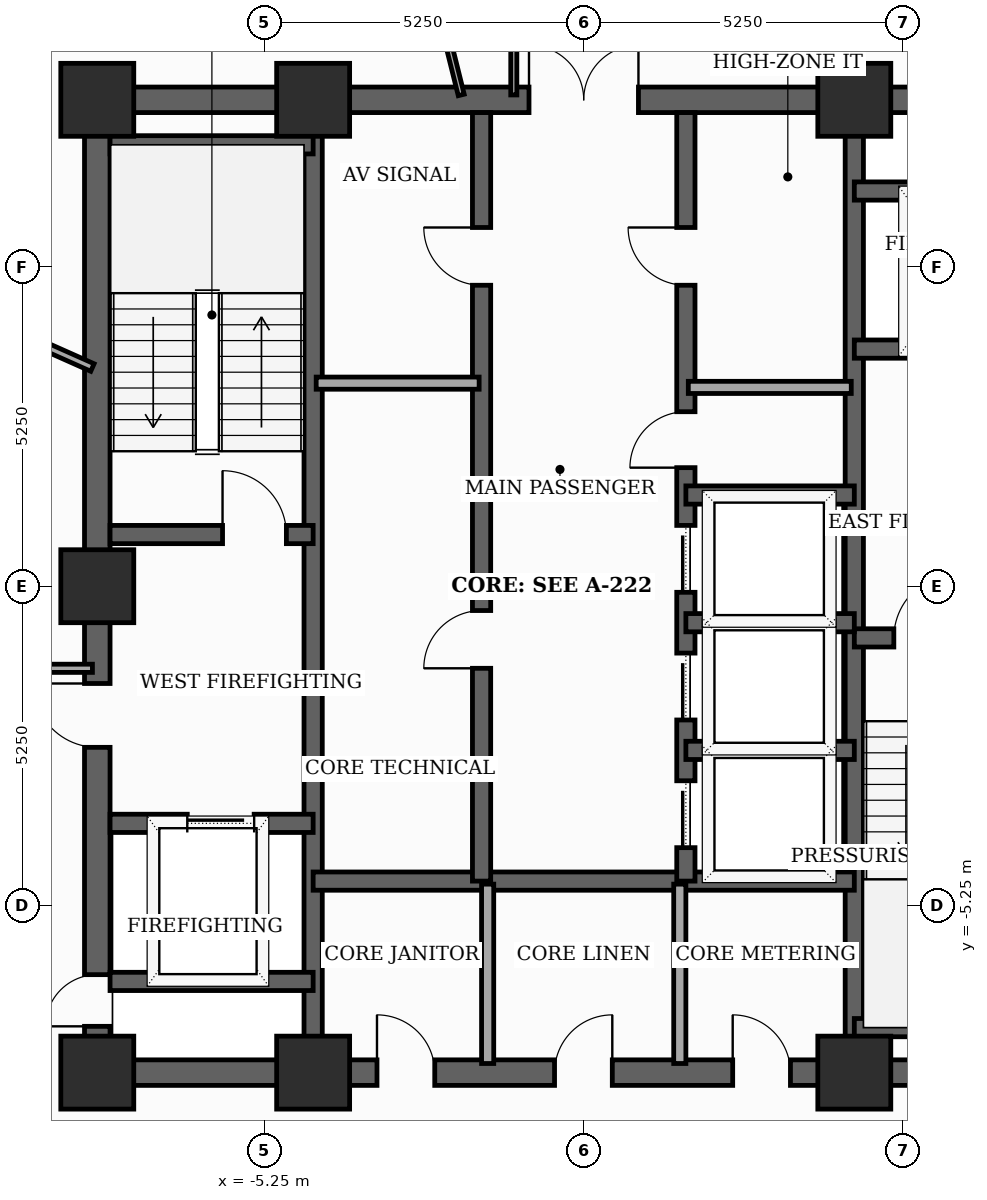
"""IFC4 building model, lengths in metres.
Left out: names, types, materials, properties, quantities, classifications, styles, units other than length and angle.
Written with IfcOpenShell. Run it as: python <this file> out.ifc"""

import sys

from ifc_helpers import new_model, si_unit, direction, frame, frame_2d, origin, origin_2d, place, context, subcontext, project, spatial, rectangle, extrude, element, fill, save


model = new_model("IFC4")
c1 = context("Model", 3, precision=1e-05, world=origin(), true_north=direction((0.0, 1.0)))
c2 = subcontext(c1, "Body", "Model", "MODEL_VIEW")
j1 = project(units=[si_unit("LENGTHUNIT", "METRE"), si_unit("PLANEANGLEUNIT", "RADIAN")], contexts=[c1])
p1 = place(None, origin())
s1 = spatial("IfcSite", under=j1, at=p1, CompositionType="ELEMENT")
p2 = place(p1, origin())
s2 = spatial("IfcBuilding", under=s1, at=p2, CompositionType="ELEMENT")
p3 = place(p2, frame((0.0, 0.0, 233.7)))
s3 = spatial("IfcBuildingStorey", under=s2, at=p3, CompositionType="ELEMENT", Elevation=233.7)
for number, where, z_axis, x_axis in (
    (1, (-8.0, -8.0, 0.0), (0.0, 0.0, 1.0), (1.0, 0.0, 0.0)),
    (2, (-4.45, -8.0, 0.0), (0.0, 0.0, 1.0), (1.0, 0.0, 0.0)),
    (3, (4.45, -8.0, 0.0), (0.0, 0.0, 1.0), (1.0, 0.0, 0.0)),
    (4, (4.45, 8.0, 0.0), (0.0, 0.0, 1.0), (1.0, 0.0, 0.0)),
    (5, (-4.45, 8.0, 0.0), (0.0, 0.0, 1.0), (1.0, 0.0, 0.0)),
    (6, (-8.0, 8.0, 0.0), (0.0, 0.0, 1.0), (1.0, 0.0, 0.0)),
    (7, (-8.0, 0.0, 0.0), (0.0, 0.0, 1.0), (1.0, 0.0, 0.0)),
):
    element("IfcColumn", number, at=place(p3, frame(where, z_axis=z_axis, x_axis=x_axis)), inside=s3, PredefinedType="COLUMN", context=c2, shape_type="SweptSolid", body=[
        extrude(rectangle(XDim=1.2, YDim=1.2, at=origin_2d()), origin(), (0.0, 0.0, 1.0), 3.7),
    ])
p4 = place(p3, frame((-8.0, -8.0, 0.0), z_axis=(0.0, 0.0, 1.0), x_axis=(0.0, 1.0, 0.0)))
e8 = element("IfcWall", 8, at=p4, inside=s3, PredefinedType="SHEAR", context=c2, shape_type="SweptSolid", body=[
    extrude(rectangle(XDim=16.0, YDim=0.42, at=frame_2d((8.0, 0.0))), origin(), (0.0, 0.0, 1.0), 3.5),
])
p5 = place(p4, frame((0.761, 0.0, 0.0)))
e9 = element("IfcOpeningElement", 9, at=p5, cuts=e8, PredefinedType="OPENING", context=c2, shape_type="SweptSolid", body=[
    extrude(rectangle(XDim=0.85, YDim=2.02, at=frame_2d((0.425, 1.01))), frame((0.0, 0.22, 0.0), z_axis=(0.0, -1.0, 0.0), x_axis=(1.0, 0.0, 0.0)), (0.0, 0.0, 1.0), 0.44),
])
p6 = place(p4, frame((5.35, 0.0, 0.0)))
e10 = element("IfcOpeningElement", 10, at=p6, cuts=e8, PredefinedType="OPENING", context=c2, shape_type="SweptSolid", body=[
    extrude(rectangle(XDim=1.05, YDim=2.15, at=frame_2d((0.525, 1.075))), frame((0.0, 0.22, 0.0), z_axis=(0.0, -1.0, 0.0), x_axis=(1.0, 0.0, 0.0)), (0.0, 0.0, 1.0), 0.44),
])
p7 = place(p3, frame((-8.0, -8.0, 0.0), z_axis=(0.0, 0.0, 1.0), x_axis=(1.0, 0.0, 0.0)))
e11 = element("IfcWall", 11, at=p7, inside=s3, PredefinedType="SHEAR", context=c2, shape_type="SweptSolid", body=[
    extrude(rectangle(XDim=16.0, YDim=0.42, at=frame_2d((8.0, 0.0))), origin(), (0.0, 0.0, 1.0), 3.5),
])
p8 = place(p7, frame((4.6, 0.0, 0.0)))
e12 = element("IfcOpeningElement", 12, at=p8, cuts=e11, PredefinedType="OPENING", context=c2, shape_type="SweptSolid", body=[
    extrude(rectangle(XDim=0.95, YDim=2.1, at=frame_2d((0.475, 1.05))), frame((0.0, 0.22, 0.0), z_axis=(0.0, -1.0, 0.0), x_axis=(1.0, 0.0, 0.0)), (0.0, 0.0, 1.0), 0.44),
])
p9 = place(p7, frame((7.52, 0.0, 0.0)))
e13 = element("IfcOpeningElement", 13, at=p9, cuts=e11, PredefinedType="OPENING", context=c2, shape_type="SweptSolid", body=[
    extrude(rectangle(XDim=0.95, YDim=2.1, at=frame_2d((0.475, 1.05))), frame((0.0, 0.22, 0.0), z_axis=(0.0, -1.0, 0.0), x_axis=(1.0, 0.0, 0.0)), (0.0, 0.0, 1.0), 0.44),
])
p10 = place(p7, frame((10.45, 0.0, 0.0)))
e14 = element("IfcOpeningElement", 14, at=p10, cuts=e11, PredefinedType="OPENING", context=c2, shape_type="SweptSolid", body=[
    extrude(rectangle(XDim=0.95, YDim=2.1, at=frame_2d((0.475, 1.05))), frame((0.0, 0.22, 0.0), z_axis=(0.0, -1.0, 0.0), x_axis=(1.0, 0.0, 0.0)), (0.0, 0.0, 1.0), 0.44),
])
p11 = place(p3, frame((-8.0, 8.0, 0.0), z_axis=(0.0, 0.0, 1.0), x_axis=(1.0, 0.0, 0.0)))
e15 = element("IfcWall", 15, at=p11, inside=s3, PredefinedType="SHEAR", context=c2, shape_type="SweptSolid", body=[
    extrude(rectangle(XDim=16.0, YDim=0.42, at=frame_2d((8.0, 0.0))), origin(), (0.0, 0.0, 1.0), 3.5),
])
p12 = place(p11, frame((7.1, 0.0, 0.0)))
e16 = element("IfcOpeningElement", 16, at=p12, cuts=e15, PredefinedType="OPENING", context=c2, shape_type="SweptSolid", body=[
    extrude(rectangle(XDim=1.8, YDim=2.15, at=frame_2d((0.9, 1.075))), frame((0.0, 0.22, 0.0), z_axis=(0.0, -1.0, 0.0), x_axis=(1.0, 0.0, 0.0)), (0.0, 0.0, 1.0), 0.44),
])
for number, where, z_axis, x_axis in (
    (17, (-4.45, -7.79, 0.0), (0.0, 0.0, 1.0), (0.0, 1.0, 0.0)),
    (18, (4.45, -7.79, 0.0), (0.0, 0.0, 1.0), (0.0, 1.0, 0.0)),
):
    element("IfcWall", number, at=place(p3, frame(where, z_axis=z_axis, x_axis=x_axis)), inside=s3, PredefinedType="SHEAR", context=c2, shape_type="SweptSolid", body=[
        extrude(rectangle(XDim=15.58, YDim=0.3, at=frame_2d((7.79, 0.0))), origin(), (0.0, 0.0, 1.0), 3.5),
    ])
p13 = place(p3, frame((-7.79, 0.85, 0.0), z_axis=(0.0, 0.0, 1.0), x_axis=(1.0, 0.0, 0.0)))
e19 = element("IfcWall", 19, at=p13, inside=s3, PredefinedType="SHEAR", context=c2, shape_type="SweptSolid", body=[
    extrude(rectangle(XDim=3.34, YDim=0.3, at=frame_2d((1.67, 0.0))), origin(), (0.0, 0.0, 1.0), 3.5),
])
p14 = place(p13, frame((1.85, 0.0, 0.0)))
e20 = element("IfcOpeningElement", 20, at=p14, cuts=e19, PredefinedType="OPENING", context=c2, shape_type="SweptSolid", body=[
    extrude(rectangle(XDim=1.05, YDim=2.15, at=frame_2d((0.525, 1.075))), frame((0.0, 0.16, 0.0), z_axis=(0.0, -1.0, 0.0), x_axis=(1.0, 0.0, 0.0)), (0.0, 0.0, 1.0), 0.32),
])
p15 = place(p3, frame((-7.79, 7.26, 0.0), z_axis=(0.0, 0.0, 1.0), x_axis=(1.0, 0.0, 0.0)))
e21 = element("IfcWall", 21, at=p15, inside=s3, PredefinedType="SHEAR", context=c2, shape_type="SweptSolid", body=[
    extrude(rectangle(XDim=3.34, YDim=0.3, at=frame_2d((1.67, 0.0))), origin(), (0.0, 0.0, 1.0), 3.5),
])
p16 = place(p3, frame((4.45, -0.85, 0.0), z_axis=(0.0, 0.0, 1.0), x_axis=(1.0, 0.0, 0.0)))
e22 = element("IfcWall", 22, at=p16, inside=s3, PredefinedType="SHEAR", context=c2, shape_type="SweptSolid", body=[
    extrude(rectangle(XDim=3.34, YDim=0.3, at=frame_2d((1.67, 0.0))), origin(), (0.0, 0.0, 1.0), 3.5),
])
p17 = place(p16, frame((0.65, 0.0, 0.0)))
e23 = element("IfcOpeningElement", 23, at=p17, cuts=e22, PredefinedType="OPENING", context=c2, shape_type="SweptSolid", body=[
    extrude(rectangle(XDim=1.05, YDim=2.15, at=frame_2d((0.525, 1.075))), frame((0.0, 0.16, 0.0), z_axis=(0.0, -1.0, 0.0), x_axis=(1.0, 0.0, 0.0)), (0.0, 0.0, 1.0), 0.32),
])
p18 = place(p3, frame((4.45, -7.26, 0.0), z_axis=(0.0, 0.0, 1.0), x_axis=(1.0, 0.0, 0.0)))
e24 = element("IfcWall", 24, at=p18, inside=s3, PredefinedType="SHEAR", context=c2, shape_type="SweptSolid", body=[
    extrude(rectangle(XDim=3.55, YDim=0.3, at=frame_2d((1.775, 0.0))), origin(), (0.0, 0.0, 1.0), 3.5),
])
p19 = place(p3, frame((-7.79, -3.9, 0.0), z_axis=(0.0, 0.0, 1.0), x_axis=(1.0, 0.0, 0.0)))
e25 = element("IfcWall", 25, at=p19, inside=s3, PredefinedType="SHEAR", context=c2, shape_type="SweptSolid", body=[
    extrude(rectangle(XDim=3.34, YDim=0.3, at=frame_2d((1.67, 0.0))), origin(), (0.0, 0.0, 1.0), 3.5),
])
p20 = place(p19, frame((1.27, 0.0, 0.0)))
e26 = element("IfcOpeningElement", 26, at=p20, cuts=e25, PredefinedType="OPENING", context=c2, shape_type="SweptSolid", body=[
    extrude(rectangle(XDim=1.1, YDim=2.1, at=frame_2d((0.55, 1.05))), frame((0.0, 0.16, 0.0), z_axis=(0.0, -1.0, 0.0), x_axis=(1.0, 0.0, 0.0)), (0.0, 0.0, 1.0), 0.32),
])
p21 = place(p3, frame((-7.79, -6.5, 0.0), z_axis=(0.0, 0.0, 1.0), x_axis=(1.0, 0.0, 0.0)))
e27 = element("IfcWall", 27, at=p21, inside=s3, PredefinedType="SHEAR", context=c2, shape_type="SweptSolid", body=[
    extrude(rectangle(XDim=3.34, YDim=0.3, at=frame_2d((1.67, 0.0))), origin(), (0.0, 0.0, 1.0), 3.5),
])
p22 = place(p3, frame((4.45, 3.9, 0.0), z_axis=(0.0, 0.0, 1.0), x_axis=(1.0, 0.0, 0.0)))
e28 = element("IfcWall", 28, at=p22, inside=s3, PredefinedType="SHEAR", context=c2, shape_type="SweptSolid", body=[
    extrude(rectangle(XDim=3.34, YDim=0.3, at=frame_2d((1.67, 0.0))), origin(), (0.0, 0.0, 1.0), 3.5),
])
p23 = place(p22, frame((1.18, 0.0, 0.0)))
e29 = element("IfcOpeningElement", 29, at=p23, cuts=e28, PredefinedType="OPENING", context=c2, shape_type="SweptSolid", body=[
    extrude(rectangle(XDim=1.1, YDim=2.1, at=frame_2d((0.55, 1.05))), frame((0.0, 0.16, 0.0), z_axis=(0.0, -1.0, 0.0), x_axis=(1.0, 0.0, 0.0)), (0.0, 0.0, 1.0), 0.32),
])
p24 = place(p3, frame((4.45, 6.5, 0.0), z_axis=(0.0, 0.0, 1.0), x_axis=(1.0, 0.0, 0.0)))
e30 = element("IfcWall", 30, at=p24, inside=s3, PredefinedType="SHEAR", context=c2, shape_type="SweptSolid", body=[
    extrude(rectangle(XDim=3.34, YDim=0.3, at=frame_2d((1.67, 0.0))), origin(), (0.0, 0.0, 1.0), 3.5),
])
p25 = place(p3, frame((-4.45, -4.85, 0.0), z_axis=(0.0, 0.0, 1.0), x_axis=(1.0, 0.0, 0.0)))
e31 = element("IfcWall", 31, at=p25, inside=s3, PredefinedType="SHEAR", context=c2, shape_type="SweptSolid", body=[
    extrude(rectangle(XDim=8.9, YDim=0.3, at=frame_2d((4.45, 0.0))), origin(), (0.0, 0.0, 1.0), 3.5),
])
p26 = place(p3, frame((-1.68, -4.85, 0.0), z_axis=(0.0, 0.0, 1.0), x_axis=(0.0, 1.0, 0.0)))
e32 = element("IfcWall", 32, at=p26, inside=s3, PredefinedType="SHEAR", context=c2, shape_type="SweptSolid", body=[
    extrude(rectangle(XDim=12.64, YDim=0.3, at=frame_2d((6.32, 0.0))), origin(), (0.0, 0.0, 1.0), 3.5),
])
p27 = place(p26, frame((3.5, 0.0, 0.0)))
e33 = element("IfcOpeningElement", 33, at=p27, cuts=e32, PredefinedType="OPENING", context=c2, shape_type="SweptSolid", body=[
    extrude(rectangle(XDim=0.95, YDim=2.1, at=frame_2d((0.475, 1.05))), frame((0.0, 0.16, 0.0), z_axis=(0.0, -1.0, 0.0), x_axis=(1.0, 0.0, 0.0)), (0.0, 0.0, 1.0), 0.32),
])
p28 = place(p26, frame((9.8, 0.0, 0.0)))
e34 = element("IfcOpeningElement", 34, at=p28, cuts=e32, PredefinedType="OPENING", context=c2, shape_type="SweptSolid", body=[
    extrude(rectangle(XDim=0.95, YDim=2.1, at=frame_2d((0.475, 1.05))), frame((0.0, 0.16, 0.0), z_axis=(0.0, -1.0, 0.0), x_axis=(1.0, 0.0, 0.0)), (0.0, 0.0, 1.0), 0.32),
])
p29 = place(p3, frame((1.68, -4.85, 0.0), z_axis=(0.0, 0.0, 1.0), x_axis=(0.0, 1.0, 0.0)))
e35 = element("IfcWall", 35, at=p29, inside=s3, PredefinedType="SHEAR", context=c2, shape_type="SweptSolid", body=[
    extrude(rectangle(XDim=12.64, YDim=0.3, at=frame_2d((6.32, 0.0))), origin(), (0.0, 0.0, 1.0), 3.5),
])
p30 = place(p29, frame((0.55, 0.0, 0.0)))
e36 = element("IfcOpeningElement", 36, at=p30, cuts=e35, PredefinedType="OPENING", context=c2, shape_type="SweptSolid", body=[
    extrude(rectangle(XDim=1.1, YDim=2.1, at=frame_2d((0.55, 1.05))), frame((0.0, 0.16, 0.0), z_axis=(0.0, -1.0, 0.0), x_axis=(1.0, 0.0, 0.0)), (0.0, 0.0, 1.0), 0.32),
])
p31 = place(p29, frame((2.65, 0.0, 0.0)))
e37 = element("IfcOpeningElement", 37, at=p31, cuts=e35, PredefinedType="OPENING", context=c2, shape_type="SweptSolid", body=[
    extrude(rectangle(XDim=1.1, YDim=2.1, at=frame_2d((0.55, 1.05))), frame((0.0, 0.16, 0.0), z_axis=(0.0, -1.0, 0.0), x_axis=(1.0, 0.0, 0.0)), (0.0, 0.0, 1.0), 0.32),
])
p32 = place(p29, frame((4.75, 0.0, 0.0)))
e38 = element("IfcOpeningElement", 38, at=p32, cuts=e35, PredefinedType="OPENING", context=c2, shape_type="SweptSolid", body=[
    extrude(rectangle(XDim=1.1, YDim=2.1, at=frame_2d((0.55, 1.05))), frame((0.0, 0.16, 0.0), z_axis=(0.0, -1.0, 0.0), x_axis=(1.0, 0.0, 0.0)), (0.0, 0.0, 1.0), 0.32),
])
p33 = place(p29, frame((6.8, 0.0, 0.0)))
e39 = element("IfcOpeningElement", 39, at=p33, cuts=e35, PredefinedType="OPENING", context=c2, shape_type="SweptSolid", body=[
    extrude(rectangle(XDim=0.92, YDim=2.1, at=frame_2d((0.46, 1.05))), frame((0.0, 0.16, 0.0), z_axis=(0.0, -1.0, 0.0), x_axis=(1.0, 0.0, 0.0)), (0.0, 0.0, 1.0), 0.32),
])
p34 = place(p29, frame((9.8, 0.0, 0.0)))
e40 = element("IfcOpeningElement", 40, at=p34, cuts=e35, PredefinedType="OPENING", context=c2, shape_type="SweptSolid", body=[
    extrude(rectangle(XDim=0.95, YDim=2.1, at=frame_2d((0.475, 1.05))), frame((0.0, 0.16, 0.0), z_axis=(0.0, -1.0, 0.0), x_axis=(1.0, 0.0, 0.0)), (0.0, 0.0, 1.0), 0.32),
])
for number, where, z_axis, x_axis in (
    (41, (1.68, 1.5, 0.0), (0.0, 0.0, 1.0), (1.0, 0.0, 0.0)),
    (42, (1.68, -2.7, 0.0), (0.0, 0.0, 1.0), (1.0, 0.0, 0.0)),
    (43, (1.68, -0.6, 0.0), (0.0, 0.0, 1.0), (1.0, 0.0, 0.0)),
):
    element("IfcWall", number, at=place(p3, frame(where, z_axis=z_axis, x_axis=x_axis)), inside=s3, PredefinedType="SHEAR", context=c2, shape_type="SweptSolid", body=[
        extrude(rectangle(XDim=2.77, YDim=0.3, at=frame_2d((1.385, 0.0))), origin(), (0.0, 0.0, 1.0), 3.5),
    ])
for number, where, z_axis, x_axis in (
    (44, (-1.58, -7.85, 0.0), (0.0, 0.0, 1.0), (0.0, 1.0, 0.0)),
    (45, (1.58, -7.85, 0.0), (0.0, 0.0, 1.0), (0.0, 1.0, 0.0)),
):
    element("IfcWall", number, at=place(p3, frame(where, z_axis=z_axis, x_axis=x_axis)), inside=s3, PredefinedType="SOLIDWALL", context=c2, shape_type="SweptSolid", body=[
        extrude(rectangle(XDim=2.95, YDim=0.2, at=frame_2d((1.475, 0.0))), origin(), (0.0, 0.0, 1.0), 2.885),
    ])
for number, where, z_axis, x_axis in (
    (46, (-4.4, 3.34, 0.0), (0.0, 0.0, 1.0), (1.0, 0.0, 0.0)),
    (47, (1.72, 3.27, 0.0), (0.0, 0.0, 1.0), (1.0, 0.0, 0.0)),
):
    element("IfcWall", number, at=place(p3, frame(where, z_axis=z_axis, x_axis=x_axis)), inside=s3, PredefinedType="SOLIDWALL", context=c2, shape_type="SweptSolid", body=[
        extrude(rectangle(XDim=2.68, YDim=0.2, at=frame_2d((1.34, 0.0))), origin(), (0.0, 0.0, 1.0), 3.5),
    ])
p35 = place(p3, frame((-8.08, -1.35, 0.0), z_axis=(0.0, 0.0, 1.0), x_axis=(-1.0, 0.0, 0.0)))
e48 = element("IfcWall", 48, at=p35, inside=s3, PredefinedType="PARTITIONING", context=c2, shape_type="SweptSolid", body=[
    extrude(rectangle(XDim=2.57, YDim=0.135, at=frame_2d((1.285, 0.0))), origin(), (0.0, 0.0, 1.0), 2.885),
])
p36 = place(p3, frame((-1.15, 10.65, 0.0), z_axis=(0.0, 0.0, 1.0), x_axis=(0.0, -1.0, 0.0)))
e49 = element("IfcWall", 49, at=p36, inside=s3, PredefinedType="MOVABLE", context=c2, shape_type="SweptSolid", body=[
    extrude(rectangle(XDim=2.57, YDim=0.1, at=frame_2d((1.285, 0.0))), origin(), (0.0, 0.0, 1.0), 2.885),
])
p37 = place(p3, frame((-8.08, 3.597, 0.0), z_axis=(0.0, 0.0, 1.0), x_axis=(-0.913494385598, 0.40685133339, 0.0)))
e50 = element("IfcWall", 50, at=p37, inside=s3, PredefinedType="PARTITIONING", context=c2, shape_type="SweptSolid", body=[
    extrude(rectangle(XDim=6.894, YDim=0.135, at=frame_2d((3.447, 0.0))), origin(), (0.0, 0.0, 1.0), 2.885),
])
p38 = place(p3, frame((-3.808, 15.271, 0.0), z_axis=(0.0, 0.0, 1.0), x_axis=(0.241993010569, -0.970277992555, 0.0)))
e51 = element("IfcWall", 51, at=p38, inside=s3, PredefinedType="MOVABLE", context=c2, shape_type="SweptSolid", body=[
    extrude(rectangle(XDim=7.411, YDim=0.1, at=frame_2d((3.706, 0.0))), origin(), (0.0, 0.0, 1.0), 2.885),
])
p39 = place(p38, frame((3.246, 0.0, 0.0)))
e52 = element("IfcOpeningElement", 52, at=p39, cuts=e51, PredefinedType="OPENING", context=c2, shape_type="SweptSolid", body=[
    extrude(rectangle(XDim=0.92, YDim=2.1, at=frame_2d((0.46, 1.05))), frame((0.0, 0.06, 0.0), z_axis=(0.0, -1.0, 0.0), x_axis=(1.0, 0.0, 0.0)), (0.0, 0.0, 1.0), 0.12),
])
p40 = place(p5, origin())
e53 = element("IfcDoor", 53, at=p40, inside=s3, OperationType="SINGLE_SWING_LEFT", PredefinedType="TRAPDOOR", context=c2, shape_type="SweptSolid", body=[
    extrude(rectangle(XDim=0.85, YDim=2.02, at=frame_2d((0.425, 1.01))), frame((0.0, 0.025, 0.0), z_axis=(0.0, -1.0, 0.0), x_axis=(1.0, 0.0, 0.0)), (0.0, 0.0, 1.0), 0.05),
])
fill(e9, e53)
p41 = place(p6, origin())
e54 = element("IfcDoor", 54, at=p41, inside=s3, OperationType="SINGLE_SWING_RIGHT", PredefinedType="DOOR", context=c2, shape_type="SweptSolid", body=[
    extrude(rectangle(XDim=1.05, YDim=2.15, at=frame_2d((0.525, 1.075))), frame((0.0, 0.025, 0.0), z_axis=(0.0, -1.0, 0.0), x_axis=(1.0, 0.0, 0.0)), (0.0, 0.0, 1.0), 0.05),
])
fill(e10, e54)
p42 = place(p8, origin())
e55 = element("IfcDoor", 55, at=p42, inside=s3, OperationType="SINGLE_SWING_LEFT", PredefinedType="DOOR", context=c2, shape_type="SweptSolid", body=[
    extrude(rectangle(XDim=0.95, YDim=2.1, at=frame_2d((0.475, 1.05))), frame((0.0, 0.025, 0.0), z_axis=(0.0, -1.0, 0.0), x_axis=(1.0, 0.0, 0.0)), (0.0, 0.0, 1.0), 0.05),
])
fill(e12, e55)
p43 = place(p9, origin())
e56 = element("IfcDoor", 56, at=p43, inside=s3, OperationType="SINGLE_SWING_RIGHT", PredefinedType="DOOR", context=c2, shape_type="SweptSolid", body=[
    extrude(rectangle(XDim=0.95, YDim=2.1, at=frame_2d((0.475, 1.05))), frame((0.0, 0.025, 0.0), z_axis=(0.0, -1.0, 0.0), x_axis=(1.0, 0.0, 0.0)), (0.0, 0.0, 1.0), 0.05),
])
fill(e13, e56)
p44 = place(p10, origin())
e57 = element("IfcDoor", 57, at=p44, inside=s3, OperationType="SINGLE_SWING_LEFT", PredefinedType="DOOR", context=c2, shape_type="SweptSolid", body=[
    extrude(rectangle(XDim=0.95, YDim=2.1, at=frame_2d((0.475, 1.05))), frame((0.0, 0.025, 0.0), z_axis=(0.0, -1.0, 0.0), x_axis=(1.0, 0.0, 0.0)), (0.0, 0.0, 1.0), 0.05),
])
fill(e14, e57)
p45 = place(p12, origin())
e58 = element("IfcDoor", 58, at=p45, inside=s3, OperationType="DOUBLE_DOOR_SINGLE_SWING", PredefinedType="DOOR", context=c2, shape_type="SweptSolid", body=[
    extrude(rectangle(XDim=1.8, YDim=2.15, at=frame_2d((0.9, 1.075))), frame((0.0, 0.025, 0.0), z_axis=(0.0, -1.0, 0.0), x_axis=(1.0, 0.0, 0.0)), (0.0, 0.0, 1.0), 0.05),
])
fill(e16, e58)
p46 = place(p14, origin())
e59 = element("IfcDoor", 59, at=p46, inside=s3, OperationType="SINGLE_SWING_LEFT", PredefinedType="DOOR", context=c2, shape_type="SweptSolid", body=[
    extrude(rectangle(XDim=1.05, YDim=2.15, at=frame_2d((0.525, 1.075))), frame((0.0, 0.025, 0.0), z_axis=(0.0, -1.0, 0.0), x_axis=(1.0, 0.0, 0.0)), (0.0, 0.0, 1.0), 0.05),
])
fill(e20, e59)
p47 = place(p17, origin())
e60 = element("IfcDoor", 60, at=p47, inside=s3, OperationType="SINGLE_SWING_RIGHT", PredefinedType="DOOR", context=c2, shape_type="SweptSolid", body=[
    extrude(rectangle(XDim=1.05, YDim=2.15, at=frame_2d((0.525, 1.075))), frame((0.0, 0.025, 0.0), z_axis=(0.0, -1.0, 0.0), x_axis=(1.0, 0.0, 0.0)), (0.0, 0.0, 1.0), 0.05),
])
fill(e23, e60)
p48 = place(p20, origin())
e61 = element("IfcDoor", 61, at=p48, inside=s3, OperationType="SLIDING_TO_LEFT", PredefinedType="DOOR", context=c2, shape_type="SweptSolid", body=[
    extrude(rectangle(XDim=1.1, YDim=2.1, at=frame_2d((0.55, 1.05))), frame((0.0, 0.025, 0.0), z_axis=(0.0, -1.0, 0.0), x_axis=(1.0, 0.0, 0.0)), (0.0, 0.0, 1.0), 0.05),
])
fill(e26, e61)
p49 = place(p27, origin())
e62 = element("IfcDoor", 62, at=p49, inside=s3, OperationType="SINGLE_SWING_LEFT", PredefinedType="DOOR", context=c2, shape_type="SweptSolid", body=[
    extrude(rectangle(XDim=0.95, YDim=2.1, at=frame_2d((0.475, 1.05))), frame((0.0, 0.025, 0.0), z_axis=(0.0, -1.0, 0.0), x_axis=(1.0, 0.0, 0.0)), (0.0, 0.0, 1.0), 0.05),
])
fill(e33, e62)
p50 = place(p28, origin())
e63 = element("IfcDoor", 63, at=p50, inside=s3, OperationType="SINGLE_SWING_RIGHT", PredefinedType="DOOR", context=c2, shape_type="SweptSolid", body=[
    extrude(rectangle(XDim=0.95, YDim=2.1, at=frame_2d((0.475, 1.05))), frame((0.0, 0.025, 0.0), z_axis=(0.0, -1.0, 0.0), x_axis=(1.0, 0.0, 0.0)), (0.0, 0.0, 1.0), 0.05),
])
fill(e34, e63)
p51 = place(p30, origin())
e64 = element("IfcDoor", 64, at=p51, inside=s3, OperationType="SLIDING_TO_LEFT", PredefinedType="DOOR", context=c2, shape_type="SweptSolid", body=[
    extrude(rectangle(XDim=1.1, YDim=2.1, at=frame_2d((0.55, 1.05))), frame((0.0, 0.025, 0.0), z_axis=(0.0, -1.0, 0.0), x_axis=(1.0, 0.0, 0.0)), (0.0, 0.0, 1.0), 0.05),
])
fill(e36, e64)
p52 = place(p31, origin())
e65 = element("IfcDoor", 65, at=p52, inside=s3, OperationType="SLIDING_TO_LEFT", PredefinedType="DOOR", context=c2, shape_type="SweptSolid", body=[
    extrude(rectangle(XDim=1.1, YDim=2.1, at=frame_2d((0.55, 1.05))), frame((0.0, 0.025, 0.0), z_axis=(0.0, -1.0, 0.0), x_axis=(1.0, 0.0, 0.0)), (0.0, 0.0, 1.0), 0.05),
])
fill(e37, e65)
p53 = place(p32, origin())
e66 = element("IfcDoor", 66, at=p53, inside=s3, OperationType="SLIDING_TO_LEFT", PredefinedType="DOOR", context=c2, shape_type="SweptSolid", body=[
    extrude(rectangle(XDim=1.1, YDim=2.1, at=frame_2d((0.55, 1.05))), frame((0.0, 0.025, 0.0), z_axis=(0.0, -1.0, 0.0), x_axis=(1.0, 0.0, 0.0)), (0.0, 0.0, 1.0), 0.05),
])
fill(e38, e66)
p54 = place(p33, origin())
e67 = element("IfcDoor", 67, at=p54, inside=s3, OperationType="SINGLE_SWING_LEFT", PredefinedType="DOOR", context=c2, shape_type="SweptSolid", body=[
    extrude(rectangle(XDim=0.92, YDim=2.1, at=frame_2d((0.46, 1.05))), frame((0.0, 0.025, 0.0), z_axis=(0.0, -1.0, 0.0), x_axis=(1.0, 0.0, 0.0)), (0.0, 0.0, 1.0), 0.05),
])
fill(e39, e67)
p55 = place(p34, origin())
e68 = element("IfcDoor", 68, at=p55, inside=s3, OperationType="SINGLE_SWING_RIGHT", PredefinedType="DOOR", context=c2, shape_type="SweptSolid", body=[
    extrude(rectangle(XDim=0.95, YDim=2.1, at=frame_2d((0.475, 1.05))), frame((0.0, 0.025, 0.0), z_axis=(0.0, -1.0, 0.0), x_axis=(1.0, 0.0, 0.0)), (0.0, 0.0, 1.0), 0.05),
])
fill(e40, e68)
save(model, sys.argv[1])
